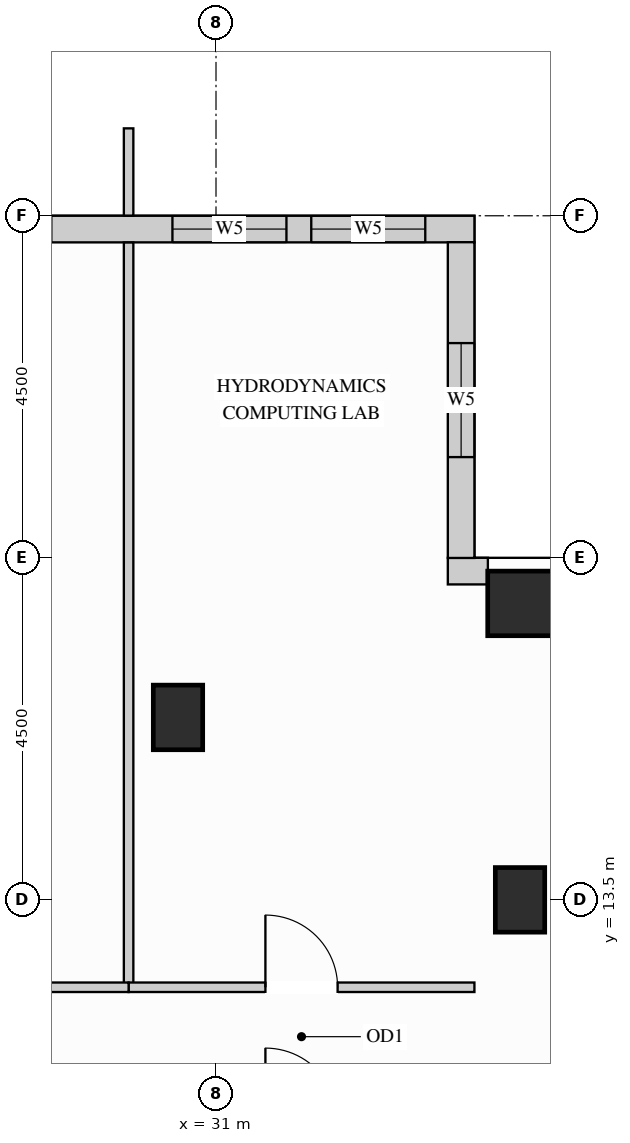
"""IFC4 building model, lengths in metres.
Left out: names, types, materials, properties, quantities, classifications, styles, units other than length and angle.
Written with IfcOpenShell. Run it as: python <this file> out.ifc"""

import sys

from ifc_helpers import new_model, si_unit, direction, frame, frame_2d, origin, origin_2d, place, context, subcontext, project, spatial, rectangle, extrude, source, transform, mapped, element, fill, save


model = new_model("IFC4")
c1 = context("Model", 3, precision=1e-05, world=origin(), true_north=direction((0.0, 1.0)))
c2 = subcontext(c1, "Body", "Model", "MODEL_VIEW")
j1 = project(units=[si_unit("LENGTHUNIT", "METRE"), si_unit("PLANEANGLEUNIT", "RADIAN")], contexts=[c1])
p1 = place(None, origin())
s1 = spatial("IfcSite", under=j1, at=p1, CompositionType="ELEMENT")
p2 = place(p1, origin())
s2 = spatial("IfcBuilding", under=s1, at=p2, CompositionType="ELEMENT")
p3 = place(p2, frame((0.0, 0.0, 252.0)))
s3 = spatial("IfcBuildingStorey", under=s2, at=p3, CompositionType="ELEMENT", Elevation=252.0)
m1 = source(origin(), c2, "Body", "SweptSolid", [
    extrude(rectangle(XDim=0.65, YDim=0.85, at=origin_2d()), origin(), (0.0, 0.0, 1.0), 3.4),
])
for number, where, z_axis, x_axis in (
    (1, (35.0, 13.5, 0.0), (0.0, 0.0, 1.0), (1.0, 0.0, 0.0)),
    (2, (30.5, 15.9, 0.0), (0.0, 0.0, 1.0), (1.0, 0.0, 0.0)),
):
    element("IfcColumn", number, at=place(p3, frame(where, z_axis=z_axis, x_axis=x_axis)), inside=s3, PredefinedType="COLUMN", context=c2, shape_type="MappedRepresentation", body=[
        mapped(m1, transform((0.0, 0.0, 0.0), x_axis=(1.0, 0.0, 0.0), y_axis=(0.0, 1.0, 0.0), z_axis=(0.0, 0.0, 1.0))),
    ])
m2 = source(origin(), c2, "Body", "SweptSolid", [
    extrude(rectangle(XDim=0.85, YDim=0.85, at=origin_2d()), origin(), (0.0, 0.0, 1.0), 3.4),
])
p4 = place(p3, frame((35.0, 17.4, 0.0), z_axis=(0.0, 0.0, 1.0), x_axis=(1.0, 0.0, 0.0)))
e3 = element("IfcColumn", 3, at=p4, inside=s3, PredefinedType="COLUMN", context=c2, shape_type="MappedRepresentation", body=[
    mapped(m2, transform((0.0, 0.0, 0.0), x_axis=(1.0, 0.0, 0.0), y_axis=(0.0, 1.0, 0.0), z_axis=(0.0, 0.0, 1.0))),
])
p5 = place(p3, frame((34.4, 22.325, 0.0), z_axis=(0.0, 0.0, 1.0), x_axis=(-1.0, 0.0, 0.0)))
e4 = element("IfcWall", 4, at=p5, inside=s3, PredefinedType="SOLIDWALL", context=c2, shape_type="SweptSolid", body=[
    extrude(rectangle(XDim=15.077, YDim=0.35, at=frame_2d((7.539, 0.0))), origin(), (0.0, 0.0, 1.0), 3.385),
])
p6 = place(p5, frame((0.647, 0.0, 0.78)))
e5 = element("IfcOpeningElement", 5, at=p6, cuts=e4, PredefinedType="OPENING", context=c2, shape_type="SweptSolid", body=[
    extrude(rectangle(XDim=1.5, YDim=2.0, at=frame_2d((0.75, 1.0))), frame((0.0, 0.185, 0.0), z_axis=(0.0, -1.0, 0.0), x_axis=(1.0, 0.0, 0.0)), (0.0, 0.0, 1.0), 0.37),
])
p7 = place(p5, frame((2.473, 0.0, 0.78)))
e6 = element("IfcOpeningElement", 6, at=p7, cuts=e4, PredefinedType="OPENING", context=c2, shape_type="SweptSolid", body=[
    extrude(rectangle(XDim=1.5, YDim=2.0, at=frame_2d((0.75, 1.0))), frame((0.0, 0.185, 0.0), z_axis=(0.0, -1.0, 0.0), x_axis=(1.0, 0.0, 0.0)), (0.0, 0.0, 1.0), 0.37),
])
p8 = place(p5, frame((5.567, 0.0, 0.78)))
e7 = element("IfcOpeningElement", 7, at=p8, cuts=e4, PredefinedType="OPENING", context=c2, shape_type="SweptSolid", body=[
    extrude(rectangle(XDim=1.5, YDim=2.0, at=frame_2d((0.75, 1.0))), frame((0.0, 0.185, 0.0), z_axis=(0.0, -1.0, 0.0), x_axis=(1.0, 0.0, 0.0)), (0.0, 0.0, 1.0), 0.37),
])
p9 = place(p5, frame((7.833, 0.0, 0.78)))
e8 = element("IfcOpeningElement", 8, at=p9, cuts=e4, PredefinedType="OPENING", context=c2, shape_type="SweptSolid", body=[
    extrude(rectangle(XDim=1.5, YDim=2.0, at=frame_2d((0.75, 1.0))), frame((0.0, 0.185, 0.0), z_axis=(0.0, -1.0, 0.0), x_axis=(1.0, 0.0, 0.0)), (0.0, 0.0, 1.0), 0.37),
])
p10 = place(p5, frame((10.986, 0.0, 0.78)))
e9 = element("IfcOpeningElement", 9, at=p10, cuts=e4, PredefinedType="OPENING", context=c2, shape_type="SweptSolid", body=[
    extrude(rectangle(XDim=1.5, YDim=2.0, at=frame_2d((0.75, 1.0))), frame((0.0, 0.185, 0.0), z_axis=(0.0, -1.0, 0.0), x_axis=(1.0, 0.0, 0.0)), (0.0, 0.0, 1.0), 0.37),
])
p11 = place(p5, frame((12.871, 0.0, 0.78)))
e10 = element("IfcOpeningElement", 10, at=p11, cuts=e4, PredefinedType="OPENING", context=c2, shape_type="SweptSolid", body=[
    extrude(rectangle(XDim=1.5, YDim=2.0, at=frame_2d((0.75, 1.0))), frame((0.0, 0.185, 0.0), z_axis=(0.0, -1.0, 0.0), x_axis=(1.0, 0.0, 0.0)), (0.0, 0.0, 1.0), 0.37),
])
m3 = source(origin(), c2, "Body", "SweptSolid", [
    extrude(rectangle(XDim=0.527, YDim=0.35, at=frame_2d((0.263, 0.0))), origin(), (0.0, 0.0, 1.0), 3.385),
])
p12 = place(p3, frame((34.577, 17.825, 0.0), z_axis=(0.0, 0.0, 1.0), x_axis=(-1.0, 0.0, 0.0)))
e11 = element("IfcWall", 11, at=p12, inside=s3, PredefinedType="SOLIDWALL", context=c2, shape_type="MappedRepresentation", body=[
    mapped(m3, transform((0.0, 0.0, 0.0), x_axis=(1.0, 0.0, 0.0), y_axis=(0.0, 1.0, 0.0), z_axis=(0.0, 0.0, 1.0))),
])
p13 = place(p3, frame((34.225, 17.998, 0.0), z_axis=(0.0, 0.0, 1.0), x_axis=(0.0, 1.0, 0.0)))
e12 = element("IfcWall", 12, at=p13, inside=s3, PredefinedType="SOLIDWALL", context=c2, shape_type="SweptSolid", body=[
    extrude(rectangle(XDim=4.154, YDim=0.35, at=frame_2d((2.077, 0.0))), origin(), (0.0, 0.0, 1.0), 3.385),
])
p14 = place(p13, frame((1.327, 0.0, 0.78)))
e13 = element("IfcOpeningElement", 13, at=p14, cuts=e12, PredefinedType="OPENING", context=c2, shape_type="SweptSolid", body=[
    extrude(rectangle(XDim=1.5, YDim=2.0, at=frame_2d((0.75, 1.0))), frame((0.0, 0.185, 0.0), z_axis=(0.0, -1.0, 0.0), x_axis=(1.0, 0.0, 0.0)), (0.0, 0.0, 1.0), 0.37),
])
m4 = source(origin(), c2, "Body", "SweptSolid", [
    extrude(rectangle(XDim=9.798, YDim=0.125, at=frame_2d((4.899, 0.0))), origin(), (0.0, 0.0, 1.0), 3.385),
])
p15 = place(p3, frame((29.85, 12.35, 0.0), z_axis=(0.0, 0.0, 1.0), x_axis=(0.0, 1.0, 0.0)))
e14 = element("IfcWall", 14, at=p15, inside=s3, PredefinedType="PARTITIONING", context=c2, shape_type="MappedRepresentation", body=[
    mapped(m4, transform((0.0, 0.0, 0.0), x_axis=(1.0, 0.0, 0.0), y_axis=(0.0, 1.0, 0.0), z_axis=(0.0, 0.0, 1.0))),
])
m5 = source(origin(), c2, "Body", "SweptSolid", [
    extrude(rectangle(XDim=1.148, YDim=0.125, at=frame_2d((0.574, 0.0))), origin(), (0.0, 0.0, 1.0), 3.385),
])
p16 = place(p3, frame((29.85, 22.502, 0.0), z_axis=(0.0, 0.0, 1.0), x_axis=(0.0, 1.0, 0.0)))
e15 = element("IfcWall", 15, at=p16, inside=s3, PredefinedType="PARTITIONING", context=c2, shape_type="MappedRepresentation", body=[
    mapped(m5, transform((0.0, 0.0, 0.0), x_axis=(1.0, 0.0, 0.0), y_axis=(0.0, 1.0, 0.0), z_axis=(0.0, 0.0, 1.0))),
])
p17 = place(p3, frame((29.85, 12.35, 0.0), z_axis=(0.0, 0.0, 1.0), x_axis=(1.0, 0.0, 0.0)))
e16 = element("IfcWall", 16, at=p17, inside=s3, PredefinedType="PARTITIONING", context=c2, shape_type="SweptSolid", body=[
    extrude(rectangle(XDim=4.55, YDim=0.125, at=frame_2d((2.275, 0.0))), origin(), (0.0, 0.0, 1.0), 3.385),
])
p18 = place(p17, frame((1.8, 0.0, 0.0)))
e17 = element("IfcOpeningElement", 17, at=p18, cuts=e16, PredefinedType="OPENING", context=c2, shape_type="SweptSolid", body=[
    extrude(rectangle(XDim=0.95, YDim=2.15, at=frame_2d((0.475, 1.075))), frame((0.0, 0.073, 0.0), z_axis=(0.0, -1.0, 0.0), x_axis=(1.0, 0.0, 0.0)), (0.0, 0.0, 1.0), 0.145),
])
p19 = place(p3, frame((24.05, 12.35, 0.0), z_axis=(0.0, 0.0, 1.0), x_axis=(1.0, 0.0, 0.0)))
e18 = element("IfcWall", 18, at=p19, inside=s3, PredefinedType="PARTITIONING", context=c2, shape_type="SweptSolid", body=[
    extrude(rectangle(XDim=5.8, YDim=0.125, at=frame_2d((2.9, 0.0))), origin(), (0.0, 0.0, 1.0), 3.385),
])
p20 = place(p19, frame((2.425, 0.0, 0.0)))
e19 = element("IfcOpeningElement", 19, at=p20, cuts=e18, PredefinedType="OPENING", context=c2, shape_type="SweptSolid", body=[
    extrude(rectangle(XDim=0.95, YDim=2.15, at=frame_2d((0.475, 1.075))), frame((0.0, 0.073, 0.0), z_axis=(0.0, -1.0, 0.0), x_axis=(1.0, 0.0, 0.0)), (0.0, 0.0, 1.0), 0.145),
])
m6 = source(origin(), c2, "Body", "SweptSolid", [
    extrude(rectangle(XDim=0.95, YDim=2.15, at=frame_2d((0.475, 1.075))), frame((0.0, 0.025, 0.0), z_axis=(0.0, -1.0, 0.0), x_axis=(1.0, 0.0, 0.0)), (0.0, 0.0, 1.0), 0.05),
])
p21 = place(p18, origin())
e20 = element("IfcDoor", 20, at=p21, inside=s3, OperationType="SINGLE_SWING_LEFT", PredefinedType="DOOR", context=c2, shape_type="MappedRepresentation", body=[
    mapped(m6, transform((0.0, 0.0, 0.0), x_axis=(1.0, 0.0, 0.0), y_axis=(0.0, 1.0, 0.0), z_axis=(0.0, 0.0, 1.0))),
])
fill(e17, e20)
m7 = source(origin(), c2, "Body", "SweptSolid", [
    extrude(rectangle(XDim=1.5, YDim=2.0, at=frame_2d((0.75, 1.0))), frame((0.0, 0.03, 0.0), z_axis=(0.0, -1.0, 0.0), x_axis=(1.0, 0.0, 0.0)), (0.0, 0.0, 1.0), 0.06),
])
p22 = place(p6, origin())
e21 = element("IfcWindow", 21, at=p22, inside=s3, PartitioningType="SINGLE_PANEL", PredefinedType="WINDOW", context=c2, shape_type="MappedRepresentation", body=[
    mapped(m7, transform((0.0, 0.0, 0.0), x_axis=(1.0, 0.0, 0.0), y_axis=(0.0, 1.0, 0.0), z_axis=(0.0, 0.0, 1.0))),
])
fill(e5, e21)
p23 = place(p7, origin())
e22 = element("IfcWindow", 22, at=p23, inside=s3, PartitioningType="SINGLE_PANEL", PredefinedType="WINDOW", context=c2, shape_type="MappedRepresentation", body=[
    mapped(m7, transform((0.0, 0.0, 0.0), x_axis=(1.0, 0.0, 0.0), y_axis=(0.0, 1.0, 0.0), z_axis=(0.0, 0.0, 1.0))),
])
fill(e6, e22)
p24 = place(p14, origin())
e23 = element("IfcWindow", 23, at=p24, inside=s3, PartitioningType="SINGLE_PANEL", PredefinedType="WINDOW", context=c2, shape_type="MappedRepresentation", body=[
    mapped(m7, transform((0.0, 0.0, 0.0), x_axis=(1.0, 0.0, 0.0), y_axis=(0.0, 1.0, 0.0), z_axis=(0.0, 0.0, 1.0))),
])
fill(e13, e23)
save(model, sys.argv[1])
